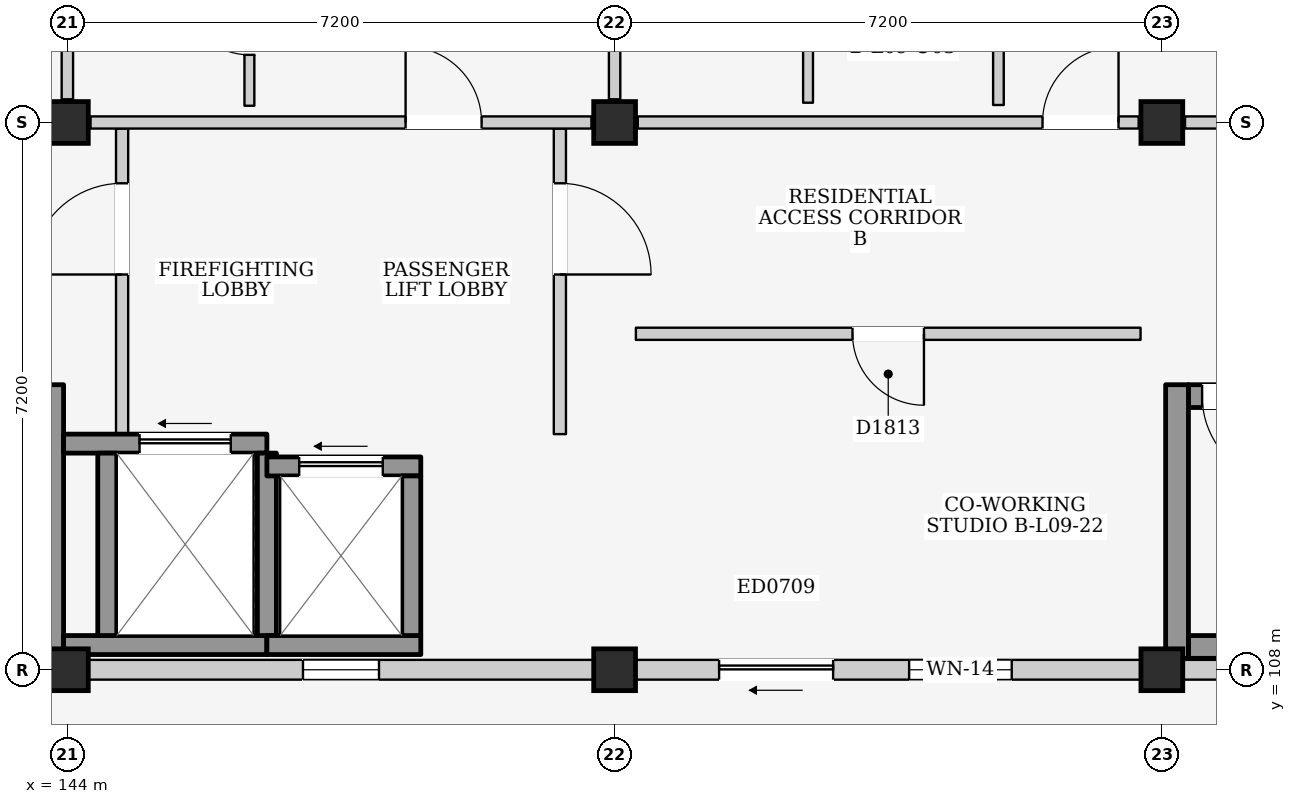
"""IFC4 building model, lengths in metres.
Left out: names, types, materials, properties, quantities, classifications, styles, units other than length and angle.
Written with IfcOpenShell. Run it as: python <this file> out.ifc"""

import sys

from ifc_helpers import new_model, si_unit, direction, frame, frame_2d, origin, origin_2d, place, context, subcontext, project, spatial, rectangle, extrude, element, fill, save


model = new_model("IFC4")
c1 = context("Model", 3, precision=1e-05, world=origin(), true_north=direction((0.0, 1.0)))
c2 = subcontext(c1, "Body", "Model", "MODEL_VIEW")
j1 = project(units=[si_unit("LENGTHUNIT", "METRE"), si_unit("PLANEANGLEUNIT", "RADIAN")], contexts=[c1])
p1 = place(None, origin())
s1 = spatial("IfcSite", under=j1, at=p1, CompositionType="ELEMENT")
p2 = place(p1, origin())
s2 = spatial("IfcBuilding", under=s1, at=p2, CompositionType="ELEMENT")
p3 = place(p2, frame((0.0, 0.0, 31.5)))
s3 = spatial("IfcBuildingStorey", under=s2, at=p3, CompositionType="ELEMENT", Elevation=31.5)
for number, where, z_axis, x_axis in (
    (1, (144.0, 108.0, 0.0), (0.0, 0.0, 1.0), (1.0, 0.0, 0.0)),
    (2, (144.0, 115.2, 0.0), (0.0, 0.0, 1.0), (1.0, 0.0, 0.0)),
    (3, (151.2, 108.0, 0.0), (0.0, 0.0, 1.0), (1.0, 0.0, 0.0)),
    (4, (151.2, 115.2, 0.0), (0.0, 0.0, 1.0), (1.0, 0.0, 0.0)),
    (5, (158.4, 108.0, 0.0), (0.0, 0.0, 1.0), (1.0, 0.0, 0.0)),
    (6, (158.4, 115.2, 0.0), (0.0, 0.0, 1.0), (1.0, 0.0, 0.0)),
):
    element("IfcColumn", number, at=place(p3, frame(where, z_axis=z_axis, x_axis=x_axis)), inside=s3, PredefinedType="COLUMN", context=c2, shape_type="SweptSolid", body=[
        extrude(rectangle(XDim=0.55, YDim=0.55, at=origin_2d()), origin(), (0.0, 0.0, 1.0), 3.3),
    ])
p4 = place(p3, frame((144.275, 108.0, 0.0), z_axis=(0.0, 0.0, 1.0), x_axis=(1.0, 0.0, 0.0)))
e7 = element("IfcWall", 7, at=p4, inside=s3, PredefinedType="ELEMENTEDWALL", context=c2, shape_type="SweptSolid", body=[
    extrude(rectangle(XDim=6.65, YDim=0.26, at=frame_2d((3.325, 0.0))), origin(), (0.0, 0.0, 1.0), 2.465),
])
p5 = place(p4, frame((2.825, 0.0, 1.2)))
e8 = element("IfcOpeningElement", 8, at=p5, cuts=e7, PredefinedType="OPENING", context=c2, shape_type="SweptSolid", body=[
    extrude(rectangle(XDim=1.0, YDim=0.9, at=frame_2d((0.5, 0.45))), frame((0.0, 0.145, 0.0), z_axis=(0.0, -1.0, 0.0), x_axis=(1.0, 0.0, 0.0)), (0.0, 0.0, 1.0), 0.29),
])
p6 = place(p3, frame((151.475, 108.0, 0.0), z_axis=(0.0, 0.0, 1.0), x_axis=(1.0, 0.0, 0.0)))
e9 = element("IfcWall", 9, at=p6, inside=s3, PredefinedType="ELEMENTEDWALL", context=c2, shape_type="SweptSolid", body=[
    extrude(rectangle(XDim=6.65, YDim=0.26, at=frame_2d((3.325, 0.0))), origin(), (0.0, 0.0, 1.0), 2.465),
])
p7 = place(p6, frame((1.1, 0.0, 0.0)))
e10 = element("IfcOpeningElement", 10, at=p7, cuts=e9, PredefinedType="OPENING", context=c2, shape_type="SweptSolid", body=[
    extrude(rectangle(XDim=1.5, YDim=2.12, at=frame_2d((0.75, 1.06))), frame((0.0, 0.145, 0.0), z_axis=(0.0, -1.0, 0.0), x_axis=(1.0, 0.0, 0.0)), (0.0, 0.0, 1.0), 0.29),
])
p8 = place(p6, frame((3.6, 0.0, 0.855)))
e11 = element("IfcOpeningElement", 11, at=p8, cuts=e9, PredefinedType="OPENING", context=c2, shape_type="SweptSolid", body=[
    extrude(rectangle(XDim=1.35, YDim=1.5, at=frame_2d((0.675, 0.75))), frame((0.0, 0.145, 0.0), z_axis=(0.0, -1.0, 0.0), x_axis=(1.0, 0.0, 0.0)), (0.0, 0.0, 1.0), 0.29),
])
p9 = place(p3, frame((158.675, 108.0, 0.0), z_axis=(0.0, 0.0, 1.0), x_axis=(1.0, 0.0, 0.0)))
e12 = element("IfcWall", 12, at=p9, inside=s3, PredefinedType="ELEMENTEDWALL", context=c2, shape_type="SweptSolid", body=[
    extrude(rectangle(XDim=6.65, YDim=0.26, at=frame_2d((3.325, 0.0))), origin(), (0.0, 0.0, 1.0), 2.465),
])
p10 = place(p9, frame((2.825, 0.0, 1.2)))
e13 = element("IfcOpeningElement", 13, at=p10, cuts=e12, PredefinedType="OPENING", context=c2, shape_type="SweptSolid", body=[
    extrude(rectangle(XDim=1.0, YDim=0.9, at=frame_2d((0.5, 0.45))), frame((0.0, 0.145, 0.0), z_axis=(0.0, -1.0, 0.0), x_axis=(1.0, 0.0, 0.0)), (0.0, 0.0, 1.0), 0.29),
])
p11 = place(p3, frame((143.8, 108.15, 0.0), z_axis=(0.0, 0.0, 1.0), x_axis=(0.0, 1.0, 0.0)))
e14 = element("IfcWall", 14, at=p11, inside=s3, PredefinedType="SHEAR", context=c2, shape_type="SweptSolid", body=[
    extrude(rectangle(XDim=3.6, YDim=0.3, at=frame_2d((1.8, 0.0))), origin(), (0.0, 0.0, 1.0), 3.08),
])
p12 = place(p3, frame((144.72, 111.1, 0.0), z_axis=(0.0, 0.0, 1.0), x_axis=(0.0, 1.0, 0.0)))
e15 = element("IfcWall", 15, at=p12, inside=s3, PredefinedType="PARTITIONING", context=c2, shape_type="SweptSolid", body=[
    extrude(rectangle(XDim=4.02, YDim=0.16, at=frame_2d((2.01, 0.0))), origin(), (0.0, 0.0, 1.0), 3.08),
])
p13 = place(p12, frame((2.1, 0.0, 0.0)))
e16 = element("IfcOpeningElement", 16, at=p13, cuts=e15, PredefinedType="OPENING", context=c2, shape_type="SweptSolid", body=[
    extrude(rectangle(XDim=1.2, YDim=2.2, at=frame_2d((0.6, 1.1))), frame((0.0, 0.095, 0.0), z_axis=(0.0, -1.0, 0.0), x_axis=(1.0, 0.0, 0.0)), (0.0, 0.0, 1.0), 0.19),
])
p14 = place(p3, frame((150.48, 111.1, 0.0), z_axis=(0.0, 0.0, 1.0), x_axis=(0.0, 1.0, 0.0)))
e17 = element("IfcWall", 17, at=p14, inside=s3, PredefinedType="PARTITIONING", context=c2, shape_type="SweptSolid", body=[
    extrude(rectangle(XDim=4.02, YDim=0.16, at=frame_2d((2.01, 0.0))), origin(), (0.0, 0.0, 1.0), 3.08),
])
p15 = place(p14, frame((2.1, 0.0, 0.0)))
e18 = element("IfcOpeningElement", 18, at=p15, cuts=e17, PredefinedType="OPENING", context=c2, shape_type="SweptSolid", body=[
    extrude(rectangle(XDim=1.2, YDim=2.2, at=frame_2d((0.6, 1.1))), frame((0.0, 0.095, 0.0), z_axis=(0.0, -1.0, 0.0), x_axis=(1.0, 0.0, 0.0)), (0.0, 0.0, 1.0), 0.19),
])
p16 = place(p3, frame((143.95, 108.325, 0.0), z_axis=(0.0, 0.0, 1.0), x_axis=(1.0, 0.0, 0.0)))
e19 = element("IfcWall", 19, at=p16, inside=s3, PredefinedType="SHEAR", context=c2, shape_type="SweptSolid", body=[
    extrude(rectangle(XDim=2.675, YDim=0.25, at=frame_2d((1.337, 0.0))), origin(), (0.0, 0.0, 1.0), 3.08),
])
p17 = place(p3, frame((143.95, 110.975, 0.0), z_axis=(0.0, 0.0, 1.0), x_axis=(1.0, 0.0, 0.0)))
e20 = element("IfcWall", 20, at=p17, inside=s3, PredefinedType="SHEAR", context=c2, shape_type="SweptSolid", body=[
    extrude(rectangle(XDim=2.675, YDim=0.25, at=frame_2d((1.337, 0.0))), origin(), (0.0, 0.0, 1.0), 3.08),
])
p18 = place(p17, frame((1.0, 0.0, 0.0)))
e21 = element("IfcOpeningElement", 21, at=p18, cuts=e20, PredefinedType="OPENING", context=c2, shape_type="SweptSolid", body=[
    extrude(rectangle(XDim=1.2, YDim=2.25, at=frame_2d((0.6, 1.125))), frame((0.0, 0.14, 0.0), z_axis=(0.0, -1.0, 0.0), x_axis=(1.0, 0.0, 0.0)), (0.0, 0.0, 1.0), 0.28),
])
for number, where, z_axis, x_axis in (
    (22, (144.525, 108.45, 0.0), (0.0, 0.0, 1.0), (0.0, 1.0, 0.0)),
    (23, (146.625, 108.45, 0.0), (0.0, 0.0, 1.0), (0.0, 1.0, 0.0)),
):
    element("IfcWall", number, at=place(p3, frame(where, z_axis=z_axis, x_axis=x_axis)), inside=s3, PredefinedType="SHEAR", context=c2, shape_type="SweptSolid", body=[
        extrude(rectangle(XDim=2.4, YDim=0.25, at=frame_2d((1.2, 0.0))), origin(), (0.0, 0.0, 1.0), 3.08),
    ])
p19 = place(p3, frame((146.625, 108.325, 0.0), z_axis=(0.0, 0.0, 1.0), x_axis=(1.0, 0.0, 0.0)))
e24 = element("IfcWall", 24, at=p19, inside=s3, PredefinedType="SHEAR", context=c2, shape_type="SweptSolid", body=[
    extrude(rectangle(XDim=2.025, YDim=0.25, at=frame_2d((1.012, 0.0))), origin(), (0.0, 0.0, 1.0), 3.08),
])
p20 = place(p3, frame((146.625, 110.675, 0.0), z_axis=(0.0, 0.0, 1.0), x_axis=(1.0, 0.0, 0.0)))
e25 = element("IfcWall", 25, at=p20, inside=s3, PredefinedType="SHEAR", context=c2, shape_type="SweptSolid", body=[
    extrude(rectangle(XDim=2.025, YDim=0.25, at=frame_2d((1.012, 0.0))), origin(), (0.0, 0.0, 1.0), 3.08),
])
p21 = place(p20, frame((0.425, 0.0, 0.0)))
e26 = element("IfcOpeningElement", 26, at=p21, cuts=e25, PredefinedType="OPENING", context=c2, shape_type="SweptSolid", body=[
    extrude(rectangle(XDim=1.1, YDim=2.15, at=frame_2d((0.55, 1.075))), frame((0.0, 0.14, 0.0), z_axis=(0.0, -1.0, 0.0), x_axis=(1.0, 0.0, 0.0)), (0.0, 0.0, 1.0), 0.28),
])
p22 = place(p3, frame((148.525, 108.45, 0.0), z_axis=(0.0, 0.0, 1.0), x_axis=(0.0, 1.0, 0.0)))
e27 = element("IfcWall", 27, at=p22, inside=s3, PredefinedType="SHEAR", context=c2, shape_type="SweptSolid", body=[
    extrude(rectangle(XDim=2.1, YDim=0.25, at=frame_2d((1.05, 0.0))), origin(), (0.0, 0.0, 1.0), 3.08),
])
p23 = place(p3, frame((158.75, 108.3, 0.0), z_axis=(0.0, 0.0, 1.0), x_axis=(1.0, 0.0, 0.0)))
e28 = element("IfcWall", 28, at=p23, inside=s3, PredefinedType="SHEAR", context=c2, shape_type="SweptSolid", body=[
    extrude(rectangle(XDim=6.5, YDim=0.3, at=frame_2d((3.25, 0.0))), origin(), (0.0, 0.0, 1.0), 3.08),
])
p24 = place(p3, frame((158.75, 111.6, 0.0), z_axis=(0.0, 0.0, 1.0), x_axis=(1.0, 0.0, 0.0)))
e29 = element("IfcWall", 29, at=p24, inside=s3, PredefinedType="SHEAR", context=c2, shape_type="SweptSolid", body=[
    extrude(rectangle(XDim=6.5, YDim=0.3, at=frame_2d((3.25, 0.0))), origin(), (0.0, 0.0, 1.0), 3.08),
])
p25 = place(p24, frame((0.18, 0.0, 0.0)))
e30 = element("IfcOpeningElement", 30, at=p25, cuts=e29, PredefinedType="OPENING", context=c2, shape_type="SweptSolid", body=[
    extrude(rectangle(XDim=1.15, YDim=2.2, at=frame_2d((0.575, 1.1))), frame((0.0, 0.165, 0.0), z_axis=(0.0, -1.0, 0.0), x_axis=(1.0, 0.0, 0.0)), (0.0, 0.0, 1.0), 0.33),
])
p26 = place(p3, frame((158.6, 108.15, 0.0), z_axis=(0.0, 0.0, 1.0), x_axis=(0.0, 1.0, 0.0)))
e31 = element("IfcWall", 31, at=p26, inside=s3, PredefinedType="SHEAR", context=c2, shape_type="SweptSolid", body=[
    extrude(rectangle(XDim=3.6, YDim=0.3, at=frame_2d((1.8, 0.0))), origin(), (0.0, 0.0, 1.0), 3.08),
])
p27 = place(p3, frame((144.0, 115.505, 0.0), z_axis=(0.0, 0.0, 1.0), x_axis=(0.0, 1.0, 0.0)))
e32 = element("IfcWall", 32, at=p27, inside=s3, PredefinedType="PARTITIONING", context=c2, shape_type="SweptSolid", body=[
    extrude(rectangle(XDim=6.59, YDim=0.15, at=frame_2d((3.295, 0.0))), origin(), (0.0, 0.0, 1.0), 2.565),
])
p28 = place(p3, frame((144.305, 115.2, 0.0), z_axis=(0.0, 0.0, 1.0), x_axis=(1.0, 0.0, 0.0)))
e33 = element("IfcWall", 33, at=p28, inside=s3, PredefinedType="PARTITIONING", context=c2, shape_type="SweptSolid", body=[
    extrude(rectangle(XDim=6.59, YDim=0.16, at=frame_2d((3.295, 0.0))), origin(), (0.0, 0.0, 1.0), 2.465),
])
p29 = place(p28, frame((4.145, 0.0, 0.0)))
e34 = element("IfcOpeningElement", 34, at=p29, cuts=e33, PredefinedType="OPENING", context=c2, shape_type="SweptSolid", body=[
    extrude(rectangle(XDim=1.0, YDim=2.15, at=frame_2d((0.5, 1.075))), frame((0.0, 0.095, 0.0), z_axis=(0.0, -1.0, 0.0), x_axis=(1.0, 0.0, 0.0)), (0.0, 0.0, 1.0), 0.19),
])
p30 = place(p3, frame((151.2, 115.505, 0.0), z_axis=(0.0, 0.0, 1.0), x_axis=(0.0, 1.0, 0.0)))
e35 = element("IfcWall", 35, at=p30, inside=s3, PredefinedType="PARTITIONING", context=c2, shape_type="SweptSolid", body=[
    extrude(rectangle(XDim=6.59, YDim=0.15, at=frame_2d((3.295, 0.0))), origin(), (0.0, 0.0, 1.0), 2.565),
])
p31 = place(p3, frame((146.395, 115.42, 0.0), z_axis=(0.0, 0.0, 1.0), x_axis=(0.0, 1.0, 0.0)))
e36 = element("IfcWall", 36, at=p31, inside=s3, PredefinedType="PARTITIONING", context=c2, shape_type="SweptSolid", body=[
    extrude(rectangle(XDim=2.22, YDim=0.13, at=frame_2d((1.11, 0.0))), origin(), (0.0, 0.0, 1.0), 3.08),
])
p32 = place(p31, frame((0.67, 0.0, 0.0)))
e37 = element("IfcOpeningElement", 37, at=p32, cuts=e36, PredefinedType="OPENING", context=c2, shape_type="SweptSolid", body=[
    extrude(rectangle(XDim=0.88, YDim=2.1, at=frame_2d((0.44, 1.05))), frame((0.0, 0.08, 0.0), z_axis=(0.0, -1.0, 0.0), x_axis=(1.0, 0.0, 0.0)), (0.0, 0.0, 1.0), 0.16),
])
p33 = place(p3, frame((151.505, 115.2, 0.0), z_axis=(0.0, 0.0, 1.0), x_axis=(1.0, 0.0, 0.0)))
e38 = element("IfcWall", 38, at=p33, inside=s3, PredefinedType="PARTITIONING", context=c2, shape_type="SweptSolid", body=[
    extrude(rectangle(XDim=6.59, YDim=0.16, at=frame_2d((3.295, 0.0))), origin(), (0.0, 0.0, 1.0), 2.465),
])
p34 = place(p33, frame((5.325, 0.0, 0.0)))
e39 = element("IfcOpeningElement", 39, at=p34, cuts=e38, PredefinedType="OPENING", context=c2, shape_type="SweptSolid", body=[
    extrude(rectangle(XDim=1.0, YDim=2.15, at=frame_2d((0.5, 1.075))), frame((0.0, 0.095, 0.0), z_axis=(0.0, -1.0, 0.0), x_axis=(1.0, 0.0, 0.0)), (0.0, 0.0, 1.0), 0.19),
])
p35 = place(p3, frame((158.705, 115.2, 0.0), z_axis=(0.0, 0.0, 1.0), x_axis=(1.0, 0.0, 0.0)))
e40 = element("IfcWall", 40, at=p35, inside=s3, PredefinedType="PARTITIONING", context=c2, shape_type="SweptSolid", body=[
    extrude(rectangle(XDim=6.59, YDim=0.16, at=frame_2d((3.295, 0.0))), origin(), (0.0, 0.0, 1.0), 2.465),
])
p36 = place(p3, frame((153.745, 115.46, 0.0), z_axis=(0.0, 0.0, 1.0), x_axis=(0.0, 1.0, 0.0)))
e41 = element("IfcWall", 41, at=p36, inside=s3, PredefinedType="PARTITIONING", context=c2, shape_type="SweptSolid", body=[
    extrude(rectangle(XDim=3.04, YDim=0.13, at=frame_2d((1.52, 0.0))), origin(), (0.0, 0.0, 1.0), 3.08),
])
p37 = place(p3, frame((156.25, 115.43, 0.0), z_axis=(0.0, 0.0, 1.0), x_axis=(0.0, 1.0, 0.0)))
e42 = element("IfcWall", 42, at=p37, inside=s3, PredefinedType="PARTITIONING", context=c2, shape_type="SweptSolid", body=[
    extrude(rectangle(XDim=3.06, YDim=0.14, at=frame_2d((1.53, 0.0))), origin(), (0.0, 0.0, 1.0), 3.08),
])
p38 = place(p3, frame((151.48, 112.42, 0.0), z_axis=(0.0, 0.0, 1.0), x_axis=(1.0, 0.0, 0.0)))
e43 = element("IfcWall", 43, at=p38, inside=s3, PredefinedType="PARTITIONING", context=c2, shape_type="SweptSolid", body=[
    extrude(rectangle(XDim=6.64, YDim=0.16, at=frame_2d((3.32, 0.0))), origin(), (0.0, 0.0, 1.0), 3.08),
])
p39 = place(p38, frame((2.85, 0.0, 0.0)))
e44 = element("IfcOpeningElement", 44, at=p39, cuts=e43, PredefinedType="OPENING", context=c2, shape_type="SweptSolid", body=[
    extrude(rectangle(XDim=0.94, YDim=2.12, at=frame_2d((0.47, 1.06))), frame((0.0, 0.095, 0.0), z_axis=(0.0, -1.0, 0.0), x_axis=(1.0, 0.0, 0.0)), (0.0, 0.0, 1.0), 0.19),
])
p40 = place(p5, origin())
e45 = element("IfcWindow", 45, at=p40, inside=s3, PartitioningType="SINGLE_PANEL", PredefinedType="WINDOW", context=c2, shape_type="SweptSolid", body=[
    extrude(rectangle(XDim=1.0, YDim=0.9, at=frame_2d((0.5, 0.45))), frame((0.0, 0.03, 0.0), z_axis=(0.0, -1.0, 0.0), x_axis=(1.0, 0.0, 0.0)), (0.0, 0.0, 1.0), 0.06),
])
fill(e8, e45)
p41 = place(p7, frame((1.5, 0.0, 0.0), z_axis=(0.0, 0.0, 1.0), x_axis=(-1.0, 0.0, 0.0)))
e46 = element("IfcDoor", 46, at=p41, inside=s3, OperationType="SLIDING_TO_LEFT", PredefinedType="DOOR", context=c2, shape_type="SweptSolid", body=[
    extrude(rectangle(XDim=1.5, YDim=2.12, at=frame_2d((0.75, 1.06))), frame((0.0, 0.025, 0.0), z_axis=(0.0, -1.0, 0.0), x_axis=(1.0, 0.0, 0.0)), (0.0, 0.0, 1.0), 0.05),
])
fill(e10, e46)
p42 = place(p8, origin())
e47 = element("IfcWindow", 47, at=p42, inside=s3, PartitioningType="SINGLE_PANEL", PredefinedType="WINDOW", context=c2, shape_type="SweptSolid", body=[
    extrude(rectangle(XDim=1.35, YDim=1.5, at=frame_2d((0.675, 0.75))), frame((0.0, 0.03, 0.0), z_axis=(0.0, -1.0, 0.0), x_axis=(1.0, 0.0, 0.0)), (0.0, 0.0, 1.0), 0.06),
])
fill(e11, e47)
p43 = place(p13, origin())
e48 = element("IfcDoor", 48, at=p43, inside=s3, OperationType="SINGLE_SWING_LEFT", PredefinedType="DOOR", context=c2, shape_type="SweptSolid", body=[
    extrude(rectangle(XDim=1.2, YDim=2.2, at=frame_2d((0.6, 1.1))), frame((0.0, 0.025, 0.0), z_axis=(0.0, -1.0, 0.0), x_axis=(1.0, 0.0, 0.0)), (0.0, 0.0, 1.0), 0.05),
])
fill(e16, e48)
p44 = place(p15, frame((1.2, 0.0, 0.0), z_axis=(0.0, 0.0, 1.0), x_axis=(-1.0, 0.0, 0.0)))
e49 = element("IfcDoor", 49, at=p44, inside=s3, OperationType="SINGLE_SWING_RIGHT", PredefinedType="DOOR", context=c2, shape_type="SweptSolid", body=[
    extrude(rectangle(XDim=1.2, YDim=2.2, at=frame_2d((0.6, 1.1))), frame((0.0, 0.025, 0.0), z_axis=(0.0, -1.0, 0.0), x_axis=(1.0, 0.0, 0.0)), (0.0, 0.0, 1.0), 0.05),
])
fill(e18, e49)
p45 = place(p18, origin())
e50 = element("IfcDoor", 50, at=p45, inside=s3, OperationType="SLIDING_TO_LEFT", PredefinedType="DOOR", context=c2, shape_type="SweptSolid", body=[
    extrude(rectangle(XDim=1.2, YDim=2.25, at=frame_2d((0.6, 1.125))), frame((0.0, 0.025, 0.0), z_axis=(0.0, -1.0, 0.0), x_axis=(1.0, 0.0, 0.0)), (0.0, 0.0, 1.0), 0.05),
])
fill(e21, e50)
p46 = place(p21, origin())
e51 = element("IfcDoor", 51, at=p46, inside=s3, OperationType="SLIDING_TO_LEFT", PredefinedType="DOOR", context=c2, shape_type="SweptSolid", body=[
    extrude(rectangle(XDim=1.1, YDim=2.15, at=frame_2d((0.55, 1.075))), frame((0.0, 0.025, 0.0), z_axis=(0.0, -1.0, 0.0), x_axis=(1.0, 0.0, 0.0)), (0.0, 0.0, 1.0), 0.05),
])
fill(e26, e51)
p47 = place(p25, frame((1.15, 0.0, 0.0), z_axis=(0.0, 0.0, 1.0), x_axis=(-1.0, 0.0, 0.0)))
e52 = element("IfcDoor", 52, at=p47, inside=s3, OperationType="SINGLE_SWING_LEFT", PredefinedType="DOOR", context=c2, shape_type="SweptSolid", body=[
    extrude(rectangle(XDim=1.15, YDim=2.2, at=frame_2d((0.575, 1.1))), frame((0.0, 0.025, 0.0), z_axis=(0.0, -1.0, 0.0), x_axis=(1.0, 0.0, 0.0)), (0.0, 0.0, 1.0), 0.05),
])
fill(e30, e52)
p48 = place(p29, origin())
e53 = element("IfcDoor", 53, at=p48, inside=s3, OperationType="SINGLE_SWING_LEFT", PredefinedType="DOOR", context=c2, shape_type="SweptSolid", body=[
    extrude(rectangle(XDim=1.0, YDim=2.15, at=frame_2d((0.5, 1.075))), frame((0.0, 0.025, 0.0), z_axis=(0.0, -1.0, 0.0), x_axis=(1.0, 0.0, 0.0)), (0.0, 0.0, 1.0), 0.05),
])
fill(e34, e53)
p49 = place(p32, origin())
e54 = element("IfcDoor", 54, at=p49, inside=s3, OperationType="SINGLE_SWING_RIGHT", PredefinedType="DOOR", context=c2, shape_type="SweptSolid", body=[
    extrude(rectangle(XDim=0.88, YDim=2.1, at=frame_2d((0.44, 1.05))), frame((0.0, 0.025, 0.0), z_axis=(0.0, -1.0, 0.0), x_axis=(1.0, 0.0, 0.0)), (0.0, 0.0, 1.0), 0.05),
])
fill(e37, e54)
p50 = place(p34, origin())
e55 = element("IfcDoor", 55, at=p50, inside=s3, OperationType="SINGLE_SWING_RIGHT", PredefinedType="DOOR", context=c2, shape_type="SweptSolid", body=[
    extrude(rectangle(XDim=1.0, YDim=2.15, at=frame_2d((0.5, 1.075))), frame((0.0, 0.025, 0.0), z_axis=(0.0, -1.0, 0.0), x_axis=(1.0, 0.0, 0.0)), (0.0, 0.0, 1.0), 0.05),
])
fill(e39, e55)
p51 = place(p39, frame((0.94, 0.0, 0.0), z_axis=(0.0, 0.0, 1.0), x_axis=(-1.0, 0.0, 0.0)))
e56 = element("IfcDoor", 56, at=p51, inside=s3, OperationType="SINGLE_SWING_LEFT", PredefinedType="DOOR", context=c2, shape_type="SweptSolid", body=[
    extrude(rectangle(XDim=0.94, YDim=2.12, at=frame_2d((0.47, 1.06))), frame((0.0, 0.025, 0.0), z_axis=(0.0, -1.0, 0.0), x_axis=(1.0, 0.0, 0.0)), (0.0, 0.0, 1.0), 0.05),
])
fill(e44, e56)
save(model, sys.argv[1])
